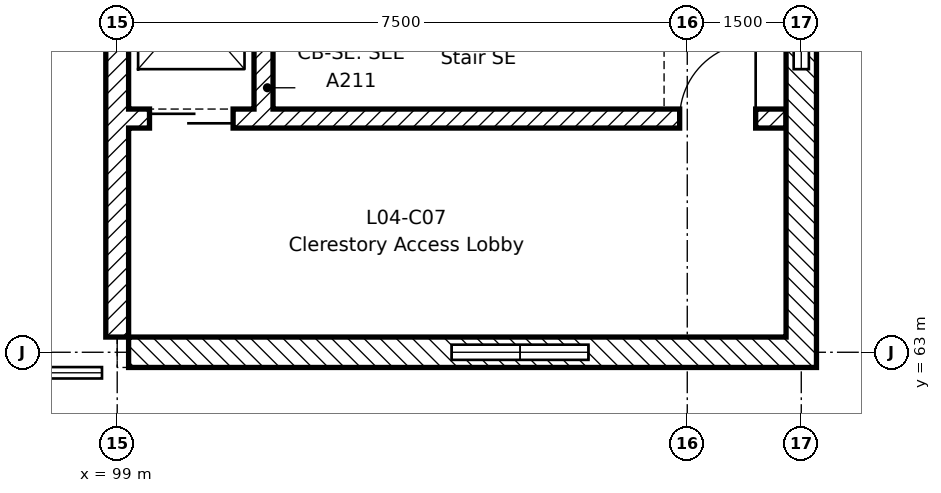
"""IFC4 building model, lengths in metres.
Left out: names, types, materials, properties, quantities, classifications, styles, units other than length and angle.
Written with IfcOpenShell. Run it as: python <this file> out.ifc"""

import sys

from ifc_helpers import new_model, si_unit, direction, frame, frame_2d, origin, place, context, subcontext, project, spatial, rectangle, extrude, element, fill, save


model = new_model("IFC4")
c1 = context("Model", 3, precision=1e-05, world=origin(), true_north=direction((0.0, 1.0)))
c2 = subcontext(c1, "Body", "Model", "MODEL_VIEW")
j1 = project(units=[si_unit("LENGTHUNIT", "METRE"), si_unit("PLANEANGLEUNIT", "RADIAN")], contexts=[c1])
p1 = place(None, origin())
s1 = spatial("IfcSite", under=j1, at=p1, CompositionType="ELEMENT")
p2 = place(p1, origin())
s2 = spatial("IfcBuilding", under=s1, at=p2, CompositionType="ELEMENT")
p3 = place(p2, frame((0.0, 0.0, 18.6)))
s3 = spatial("IfcBuildingStorey", under=s2, at=p3, CompositionType="ELEMENT", Elevation=18.6)
p4 = place(p3, frame((99.0, 63.2, 0.0), z_axis=(0.0, 0.0, 1.0), x_axis=(0.0, 1.0, 0.0)))
e1 = element("IfcWall", 1, at=p4, inside=s3, PredefinedType="SHEAR", context=c2, shape_type="SweptSolid", body=[
    extrude(rectangle(XDim=8.95, YDim=0.3, at=frame_2d((4.475, 0.0))), origin(), (0.0, 0.0, 1.0), 3.95),
])
p5 = place(p3, frame((107.8, 66.075, 0.0), z_axis=(0.0, 0.0, 1.0), x_axis=(-1.0, 0.0, 0.0)))
e2 = element("IfcWall", 2, at=p5, inside=s3, PredefinedType="SHEAR", context=c2, shape_type="SweptSolid", body=[
    extrude(rectangle(XDim=8.65, YDim=0.25, at=frame_2d((4.325, 0.0))), origin(), (0.0, 0.0, 1.0), 3.95),
])
p6 = place(p5, frame((0.4, 0.0, 0.0)))
e3 = element("IfcOpeningElement", 3, at=p6, cuts=e2, PredefinedType="OPENING", context=c2, shape_type="SweptSolid", body=[
    extrude(rectangle(XDim=1.0, YDim=2.1, at=frame_2d((0.5, 1.05))), frame((0.0, 0.135, 0.0), z_axis=(0.0, -1.0, 0.0), x_axis=(1.0, 0.0, 0.0)), (0.0, 0.0, 1.0), 0.27),
])
p7 = place(p5, frame((7.275, 0.0, 0.0)))
e4 = element("IfcOpeningElement", 4, at=p7, cuts=e2, PredefinedType="OPENING", context=c2, shape_type="SweptSolid", body=[
    extrude(rectangle(XDim=1.1, YDim=2.1, at=frame_2d((0.55, 1.05))), frame((0.0, 0.135, 0.0), z_axis=(0.0, -1.0, 0.0), x_axis=(1.0, 0.0, 0.0)), (0.0, 0.0, 1.0), 0.27),
])
p8 = place(p3, frame((100.925, 66.2, 0.0), z_axis=(0.0, 0.0, 1.0), x_axis=(0.0, 1.0, 0.0)))
e5 = element("IfcWall", 5, at=p8, inside=s3, PredefinedType="SHEAR", context=c2, shape_type="SweptSolid", body=[
    extrude(rectangle(XDim=2.85, YDim=0.25, at=frame_2d((1.425, 0.0))), origin(), (0.0, 0.0, 1.0), 3.95),
])
p9 = place(p3, frame((99.15, 63.0, 0.0), z_axis=(0.0, 0.0, 1.0), x_axis=(1.0, 0.0, 0.0)))
e6 = element("IfcWall", 6, at=p9, inside=s3, PredefinedType="STANDARD", context=c2, shape_type="SweptSolid", body=[
    extrude(rectangle(XDim=4.25, YDim=0.4, at=frame_2d((2.125, 0.0))), origin(), (0.0, 0.0, 1.0), 3.95),
])
p10 = place(p3, frame((105.2, 63.0, 0.0), z_axis=(0.0, 0.0, 1.0), x_axis=(1.0, 0.0, 0.0)))
e7 = element("IfcWall", 7, at=p10, inside=s3, PredefinedType="STANDARD", context=c2, shape_type="SweptSolid", body=[
    extrude(rectangle(XDim=3.0, YDim=0.4, at=frame_2d((1.5, 0.0))), origin(), (0.0, 0.0, 1.0), 3.95),
])
p11 = place(p3, frame((103.4, 63.0, 0.0), z_axis=(0.0, 0.0, 1.0), x_axis=(1.0, 0.0, 0.0)))
e8 = element("IfcWall", 8, at=p11, inside=s3, PredefinedType="STANDARD", context=c2, shape_type="SweptSolid", body=[
    extrude(rectangle(XDim=1.8, YDim=0.4, at=frame_2d((0.9, 0.0))), origin(), (0.0, 0.0, 1.0), 0.9),
])
p12 = place(p3, frame((108.0, 63.2, 0.0), z_axis=(0.0, 0.0, 1.0), x_axis=(0.0, 1.0, 0.0)))
e9 = element("IfcWall", 9, at=p12, inside=s3, PredefinedType="STANDARD", context=c2, shape_type="SweptSolid", body=[
    extrude(rectangle(XDim=3.525, YDim=0.4, at=frame_2d((1.763, 0.0))), origin(), (0.0, 0.0, 1.0), 3.95),
])
p13 = place(p3, frame((108.0, 66.725, 0.0), z_axis=(0.0, 0.0, 1.0), x_axis=(0.0, 1.0, 0.0)))
e10 = element("IfcWall", 10, at=p13, inside=s3, PredefinedType="STANDARD", context=c2, shape_type="SweptSolid", body=[
    extrude(rectangle(XDim=1.8, YDim=0.4, at=frame_2d((0.9, 0.0))), origin(), (0.0, 0.0, 1.0), 0.9),
])
p14 = place(p6, frame((1.0, 0.0, 0.0), z_axis=(0.0, 0.0, 1.0), x_axis=(-1.0, 0.0, 0.0)))
e11 = element("IfcDoor", 11, at=p14, inside=s3, OperationType="SINGLE_SWING_RIGHT", PredefinedType="DOOR", context=c2, shape_type="SweptSolid", body=[
    extrude(rectangle(XDim=1.0, YDim=2.1, at=frame_2d((0.5, 1.05))), frame((0.0, 0.025, 0.0), z_axis=(0.0, -1.0, 0.0), x_axis=(1.0, 0.0, 0.0)), (0.0, 0.0, 1.0), 0.05),
])
fill(e3, e11)
p15 = place(p7, origin())
e12 = element("IfcDoor", 12, at=p15, inside=s3, OperationType="SLIDING_TO_LEFT", PredefinedType="DOOR", context=c2, shape_type="SweptSolid", body=[
    extrude(rectangle(XDim=1.1, YDim=2.1, at=frame_2d((0.55, 1.05))), frame((0.0, 0.025, 0.0), z_axis=(0.0, -1.0, 0.0), x_axis=(1.0, 0.0, 0.0)), (0.0, 0.0, 1.0), 0.05),
])
fill(e4, e12)
save(model, sys.argv[1])
